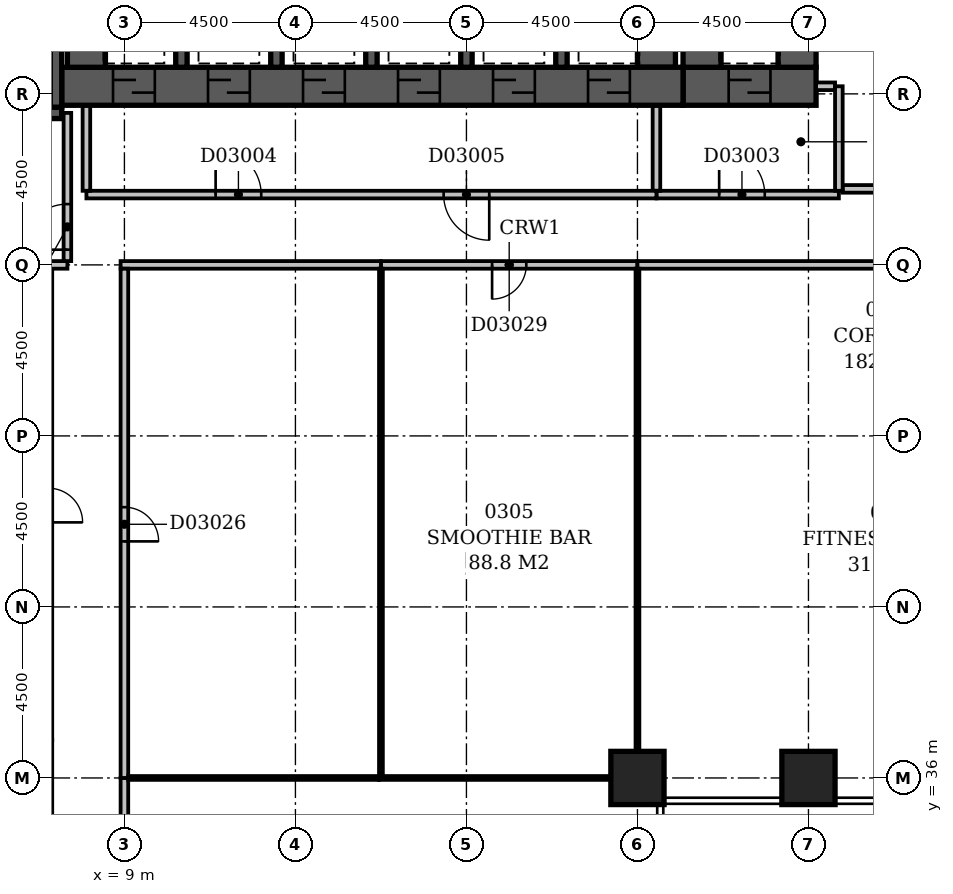
"""IFC4 building model, lengths in metres.
Left out: names, types, materials, properties, quantities, classifications, styles, units other than length and angle.
Written with IfcOpenShell. Run it as: python <this file> out.ifc"""

import sys

from ifc_helpers import new_model, si_unit, direction, frame, frame_2d, origin, origin_2d, place, context, subcontext, project, spatial, rectangle, extrude, element, fill, save


model = new_model("IFC4")
c1 = context("Model", 3, precision=1e-05, world=origin(), true_north=direction((0.0, 1.0)))
c2 = subcontext(c1, "Body", "Model", "MODEL_VIEW")
j1 = project(units=[si_unit("LENGTHUNIT", "METRE"), si_unit("PLANEANGLEUNIT", "RADIAN")], contexts=[c1])
p1 = place(None, origin())
s1 = spatial("IfcSite", under=j1, at=p1, CompositionType="ELEMENT")
p2 = place(p1, origin())
s2 = spatial("IfcBuilding", under=s1, at=p2, CompositionType="ELEMENT")
p3 = place(p2, frame((0.0, 0.0, 19.0)))
s3 = spatial("IfcBuildingStorey", under=s2, at=p3, CompositionType="ELEMENT", Elevation=19.0)
p4 = place(p3, frame((0.35, 53.5, -0.4), z_axis=(0.0, 0.0, 1.0), x_axis=(1.0, 0.0, 0.0)))
e1 = element("IfcWall", 1, at=p4, inside=s3, PredefinedType="SHEAR", context=c2, shape_type="SweptSolid", body=[
    extrude(rectangle(XDim=7.0, YDim=0.3, at=frame_2d((3.5, 0.0))), origin(), (0.0, 0.0, 1.0), 4.95),
])
p5 = place(p4, frame((5.58, 0.0, 0.4)))
e2 = element("IfcOpeningElement", 2, at=p5, cuts=e1, PredefinedType="OPENING", context=c2, shape_type="SweptSolid", body=[
    extrude(rectangle(XDim=1.1, YDim=2.1, at=frame_2d((0.55, 1.05))), frame((0.0, 0.162, 0.0), z_axis=(0.0, -1.0, 0.0), x_axis=(1.0, 0.0, 0.0)), (0.0, 0.0, 1.0), 0.324),
])
p6 = place(p3, frame((7.2, 53.65, -0.4), z_axis=(0.0, 0.0, 1.0), x_axis=(0.0, 1.0, 0.0)))
e3 = element("IfcWall", 3, at=p6, inside=s3, PredefinedType="SHEAR", context=c2, shape_type="SweptSolid", body=[
    extrude(rectangle(XDim=4.2, YDim=0.3, at=frame_2d((2.1, 0.0))), origin(), (0.0, 0.0, 1.0), 4.95),
])
p7 = place(p3, frame((7.35, 54.2, -0.4), z_axis=(0.0, 0.0, 1.0), x_axis=(1.0, 0.0, 0.0)))
e4 = element("IfcWall", 4, at=p7, inside=s3, PredefinedType="SHEAR", context=c2, shape_type="SweptSolid", body=[
    extrude(rectangle(XDim=16.35, YDim=1.0, at=frame_2d((8.175, 0.0))), origin(), (0.0, 0.0, 1.0), 4.95),
])
p8 = place(p7, frame((1.35, 0.0, 0.4)))
e5 = element("IfcOpeningElement", 5, at=p8, cuts=e4, PredefinedType="OPENING", context=c2, shape_type="SweptSolid", body=[
    extrude(rectangle(XDim=1.1, YDim=2.1, at=frame_2d((0.55, 1.05))), frame((0.0, 0.512, 0.0), z_axis=(0.0, -1.0, 0.0), x_axis=(1.0, 0.0, 0.0)), (0.0, 0.0, 1.0), 1.024),
])
p9 = place(p7, frame((3.85, 0.0, 0.4)))
e6 = element("IfcOpeningElement", 6, at=p9, cuts=e4, PredefinedType="OPENING", context=c2, shape_type="SweptSolid", body=[
    extrude(rectangle(XDim=1.1, YDim=2.1, at=frame_2d((0.55, 1.05))), frame((0.0, 0.512, 0.0), z_axis=(0.0, -1.0, 0.0), x_axis=(1.0, 0.0, 0.0)), (0.0, 0.0, 1.0), 1.024),
])
p10 = place(p7, frame((6.35, 0.0, 0.4)))
e7 = element("IfcOpeningElement", 7, at=p10, cuts=e4, PredefinedType="OPENING", context=c2, shape_type="SweptSolid", body=[
    extrude(rectangle(XDim=1.1, YDim=2.1, at=frame_2d((0.55, 1.05))), frame((0.0, 0.512, 0.0), z_axis=(0.0, -1.0, 0.0), x_axis=(1.0, 0.0, 0.0)), (0.0, 0.0, 1.0), 1.024),
])
p11 = place(p7, frame((8.85, 0.0, 0.4)))
e8 = element("IfcOpeningElement", 8, at=p11, cuts=e4, PredefinedType="OPENING", context=c2, shape_type="SweptSolid", body=[
    extrude(rectangle(XDim=1.1, YDim=2.1, at=frame_2d((0.55, 1.05))), frame((0.0, 0.512, 0.0), z_axis=(0.0, -1.0, 0.0), x_axis=(1.0, 0.0, 0.0)), (0.0, 0.0, 1.0), 1.024),
])
p12 = place(p7, frame((11.35, 0.0, 0.4)))
e9 = element("IfcOpeningElement", 9, at=p12, cuts=e4, PredefinedType="OPENING", context=c2, shape_type="SweptSolid", body=[
    extrude(rectangle(XDim=1.1, YDim=2.1, at=frame_2d((0.55, 1.05))), frame((0.0, 0.512, 0.0), z_axis=(0.0, -1.0, 0.0), x_axis=(1.0, 0.0, 0.0)), (0.0, 0.0, 1.0), 1.024),
])
p13 = place(p7, frame((13.85, 0.0, 0.4)))
e10 = element("IfcOpeningElement", 10, at=p13, cuts=e4, PredefinedType="OPENING", context=c2, shape_type="SweptSolid", body=[
    extrude(rectangle(XDim=1.1, YDim=2.1, at=frame_2d((0.55, 1.05))), frame((0.0, 0.512, 0.0), z_axis=(0.0, -1.0, 0.0), x_axis=(1.0, 0.0, 0.0)), (0.0, 0.0, 1.0), 1.024),
])
p14 = place(p3, frame((8.0, 54.7, -0.4), z_axis=(0.0, 0.0, 1.0), x_axis=(0.0, 1.0, 0.0)))
e11 = element("IfcWall", 11, at=p14, inside=s3, PredefinedType="SHEAR", context=c2, shape_type="SweptSolid", body=[
    extrude(rectangle(XDim=2.8, YDim=1.0, at=frame_2d((1.4, 0.0))), origin(), (0.0, 0.0, 1.0), 4.95),
])
for number, where, z_axis, x_axis in (
    (12, (10.5, 54.7, -0.4), (0.0, 0.0, 1.0), (0.0, 1.0, 0.0)),
    (13, (13.0, 54.7, -0.4), (0.0, 0.0, 1.0), (0.0, 1.0, 0.0)),
    (14, (15.5, 54.7, -0.4), (0.0, 0.0, 1.0), (0.0, 1.0, 0.0)),
    (15, (18.0, 54.7, -0.4), (0.0, 0.0, 1.0), (0.0, 1.0, 0.0)),
    (16, (20.5, 54.7, -0.4), (0.0, 0.0, 1.0), (0.0, 1.0, 0.0)),
):
    element("IfcWall", number, at=place(p3, frame(where, z_axis=z_axis, x_axis=x_axis)), inside=s3, PredefinedType="SHEAR", context=c2, shape_type="SweptSolid", body=[
        extrude(rectangle(XDim=2.8, YDim=0.3, at=frame_2d((1.4, 0.0))), origin(), (0.0, 0.0, 1.0), 4.95),
    ])
p15 = place(p3, frame((23.0, 54.7, -0.4), z_axis=(0.0, 0.0, 1.0), x_axis=(0.0, 1.0, 0.0)))
e17 = element("IfcWall", 17, at=p15, inside=s3, PredefinedType="SHEAR", context=c2, shape_type="SweptSolid", body=[
    extrude(rectangle(XDim=2.8, YDim=1.0, at=frame_2d((1.4, 0.0))), origin(), (0.0, 0.0, 1.0), 4.95),
])
p16 = place(p3, frame((23.7, 54.2, -0.4), z_axis=(0.0, 0.0, 1.0), x_axis=(1.0, 0.0, 0.0)))
e18 = element("IfcWall", 18, at=p16, inside=s3, PredefinedType="SHEAR", context=c2, shape_type="SweptSolid", body=[
    extrude(rectangle(XDim=3.5, YDim=1.0, at=frame_2d((1.75, 0.0))), origin(), (0.0, 0.0, 1.0), 4.95),
])
p17 = place(p16, frame((1.2, 0.0, 0.4)))
e19 = element("IfcOpeningElement", 19, at=p17, cuts=e18, PredefinedType="OPENING", context=c2, shape_type="SweptSolid", body=[
    extrude(rectangle(XDim=1.1, YDim=2.1, at=frame_2d((0.55, 1.05))), frame((0.0, 0.512, 0.0), z_axis=(0.0, -1.0, 0.0), x_axis=(1.0, 0.0, 0.0)), (0.0, 0.0, 1.0), 1.024),
])
for number, where, z_axis, x_axis in (
    (20, (24.2, 54.7, -0.4), (0.0, 0.0, 1.0), (0.0, 1.0, 0.0)),
    (21, (26.7, 54.7, -0.4), (0.0, 0.0, 1.0), (0.0, 1.0, 0.0)),
):
    element("IfcWall", number, at=place(p3, frame(where, z_axis=z_axis, x_axis=x_axis)), inside=s3, PredefinedType="SHEAR", context=c2, shape_type="SweptSolid", body=[
        extrude(rectangle(XDim=2.8, YDim=1.0, at=frame_2d((1.4, 0.0))), origin(), (0.0, 0.0, 1.0), 4.95),
    ])
for number, where, z_axis, x_axis in (
    (22, (22.5, 36.0, -0.4), (0.0, 0.0, 1.0), (1.0, 0.0, 0.0)),
    (23, (27.0, 36.0, -0.4), (0.0, 0.0, 1.0), (1.0, 0.0, 0.0)),
):
    element("IfcColumn", number, at=place(p3, frame(where, z_axis=z_axis, x_axis=x_axis)), inside=s3, PredefinedType="COLUMN", context=c2, shape_type="SweptSolid", body=[
        extrude(rectangle(XDim=1.4, YDim=1.4, at=origin_2d()), origin(), (0.0, 0.0, 1.0), 4.95),
    ])
p18 = place(p3, frame((8.0, 51.35, 0.0), z_axis=(0.0, 0.0, 1.0), x_axis=(1.0, 0.0, 0.0)))
e24 = element("IfcWall", 24, at=p18, inside=s3, PredefinedType="PARTITIONING", context=c2, shape_type="SweptSolid", body=[
    extrude(rectangle(XDim=15.0, YDim=0.2, at=frame_2d((7.5, 0.0))), origin(), (0.0, 0.0, 1.0), 4.55),
])
p19 = place(p18, frame((3.4, 0.0, 0.0)))
e25 = element("IfcOpeningElement", 25, at=p19, cuts=e24, PredefinedType="OPENING", context=c2, shape_type="SweptSolid", body=[
    extrude(rectangle(XDim=1.2, YDim=2.1, at=frame_2d((0.6, 1.05))), frame((0.0, 0.112, 0.0), z_axis=(0.0, -1.0, 0.0), x_axis=(1.0, 0.0, 0.0)), (0.0, 0.0, 1.0), 0.224),
])
p20 = place(p18, frame((9.4, 0.0, 0.0)))
e26 = element("IfcOpeningElement", 26, at=p20, cuts=e24, PredefinedType="OPENING", context=c2, shape_type="SweptSolid", body=[
    extrude(rectangle(XDim=1.2, YDim=2.1, at=frame_2d((0.6, 1.05))), frame((0.0, 0.112, 0.0), z_axis=(0.0, -1.0, 0.0), x_axis=(1.0, 0.0, 0.0)), (0.0, 0.0, 1.0), 0.224),
])
for number, where, z_axis, x_axis in (
    (27, (23.0, 51.45, 0.0), (0.0, 0.0, 1.0), (0.0, 1.0, 0.0)),
    (28, (8.0, 51.45, 0.0), (0.0, 0.0, 1.0), (0.0, 1.0, 0.0)),
):
    element("IfcWall", number, at=place(p3, frame(where, z_axis=z_axis, x_axis=x_axis)), inside=s3, PredefinedType="PARTITIONING", context=c2, shape_type="SweptSolid", body=[
        extrude(rectangle(XDim=2.23, YDim=0.2, at=frame_2d((1.115, 0.0))), origin(), (0.0, 0.0, 1.0), 4.55),
    ])
p21 = place(p3, frame((23.0, 51.35, 0.0), z_axis=(0.0, 0.0, 1.0), x_axis=(1.0, 0.0, 0.0)))
e29 = element("IfcWall", 29, at=p21, inside=s3, PredefinedType="PARTITIONING", context=c2, shape_type="SweptSolid", body=[
    extrude(rectangle(XDim=4.8, YDim=0.2, at=frame_2d((2.4, 0.0))), origin(), (0.0, 0.0, 1.0), 4.55),
])
p22 = place(p21, frame((1.65, 0.0, 0.0)))
e30 = element("IfcOpeningElement", 30, at=p22, cuts=e29, PredefinedType="OPENING", context=c2, shape_type="SweptSolid", body=[
    extrude(rectangle(XDim=1.2, YDim=2.1, at=frame_2d((0.6, 1.05))), frame((0.0, 0.112, 0.0), z_axis=(0.0, -1.0, 0.0), x_axis=(1.0, 0.0, 0.0)), (0.0, 0.0, 1.0), 0.224),
])
p23 = place(p3, frame((27.8, 51.45, 0.0), z_axis=(0.0, 0.0, 1.0), x_axis=(0.0, 1.0, 0.0)))
e31 = element("IfcWall", 31, at=p23, inside=s3, PredefinedType="PARTITIONING", context=c2, shape_type="SweptSolid", body=[
    extrude(rectangle(XDim=2.75, YDim=0.2, at=frame_2d((1.375, 0.0))), origin(), (0.0, 0.0, 1.0), 4.55),
])
p24 = place(p3, frame((27.2, 54.2, 0.0), z_axis=(0.0, 0.0, 1.0), x_axis=(1.0, 0.0, 0.0)))
e32 = element("IfcWall", 32, at=p24, inside=s3, PredefinedType="PARTITIONING", context=c2, shape_type="SweptSolid", body=[
    extrude(rectangle(XDim=0.5, YDim=0.2, at=frame_2d((0.25, 0.0))), origin(), (0.0, 0.0, 1.0), 4.55),
])
p25 = place(p3, frame((0.5, 49.5, 0.0), z_axis=(0.0, 0.0, 1.0), x_axis=(1.0, 0.0, 0.0)))
e33 = element("IfcWall", 33, at=p25, inside=s3, PredefinedType="PARTITIONING", context=c2, shape_type="SweptSolid", body=[
    extrude(rectangle(XDim=7.0, YDim=0.2, at=frame_2d((3.5, 0.0))), origin(), (0.0, 0.0, 1.0), 4.55),
])
p26 = place(p3, frame((7.5, 49.6, 0.0), z_axis=(0.0, 0.0, 1.0), x_axis=(0.0, 1.0, 0.0)))
e34 = element("IfcWall", 34, at=p26, inside=s3, PredefinedType="PARTITIONING", context=c2, shape_type="SweptSolid", body=[
    extrude(rectangle(XDim=3.9, YDim=0.2, at=frame_2d((1.95, 0.0))), origin(), (0.0, 0.0, 1.0), 4.55),
])
p27 = place(p26, frame((0.3, 0.0, 0.0)))
e35 = element("IfcOpeningElement", 35, at=p27, cuts=e34, PredefinedType="OPENING", context=c2, shape_type="SweptSolid", body=[
    extrude(rectangle(XDim=1.2, YDim=2.1, at=frame_2d((0.6, 1.05))), frame((0.0, 0.112, 0.0), z_axis=(0.0, -1.0, 0.0), x_axis=(1.0, 0.0, 0.0)), (0.0, 0.0, 1.0), 0.224),
])
p28 = place(p3, frame((9.0, 27.0, 0.0), z_axis=(0.0, 0.0, 1.0), x_axis=(0.0, 1.0, 0.0)))
e36 = element("IfcWall", 36, at=p28, inside=s3, PredefinedType="PARTITIONING", context=c2, shape_type="SweptSolid", body=[
    extrude(rectangle(XDim=9.0, YDim=0.2, at=frame_2d((4.5, 0.0))), origin(), (0.0, 0.0, 1.0), 4.55),
])
p29 = place(p28, frame((4.05, 0.0, 0.0)))
e37 = element("IfcOpeningElement", 37, at=p29, cuts=e36, PredefinedType="OPENING", context=c2, shape_type="SweptSolid", body=[
    extrude(rectangle(XDim=0.9, YDim=2.1, at=frame_2d((0.45, 1.05))), frame((0.0, 0.112, 0.0), z_axis=(0.0, -1.0, 0.0), x_axis=(1.0, 0.0, 0.0)), (0.0, 0.0, 1.0), 0.224),
])
p30 = place(p3, frame((22.5, 35.35, 0.0), z_axis=(0.0, 0.0, 1.0), x_axis=(0.0, 1.0, 0.0)))
e38 = element("IfcWall", 38, at=p30, inside=s3, PredefinedType="PARTITIONING", context=c2, shape_type="SweptSolid", body=[
    extrude(rectangle(XDim=0.6, YDim=0.1, at=frame_2d((0.3, 0.0))), origin(), (0.0, 0.0, 1.0), 3.9),
])
p31 = place(p3, frame((9.0, 36.0, 0.0), z_axis=(0.0, 0.0, 1.0), x_axis=(0.0, 1.0, 0.0)))
e39 = element("IfcWall", 39, at=p31, inside=s3, PredefinedType="PARTITIONING", context=c2, shape_type="SweptSolid", body=[
    extrude(rectangle(XDim=13.4, YDim=0.2, at=frame_2d((6.7, 0.0))), origin(), (0.0, 0.0, 1.0), 4.55),
])
p32 = place(p31, frame((6.225, 0.0, 0.0)))
e40 = element("IfcOpeningElement", 40, at=p32, cuts=e39, PredefinedType="OPENING", context=c2, shape_type="SweptSolid", body=[
    extrude(rectangle(XDim=0.9, YDim=2.1, at=frame_2d((0.45, 1.05))), frame((0.0, 0.112, 0.0), z_axis=(0.0, -1.0, 0.0), x_axis=(1.0, 0.0, 0.0)), (0.0, 0.0, 1.0), 0.224),
])
p33 = place(p3, frame((15.7, 36.0, 0.0), z_axis=(0.0, 0.0, 1.0), x_axis=(-1.0, 0.0, 0.0)))
e41 = element("IfcWall", 41, at=p33, inside=s3, PredefinedType="PARTITIONING", context=c2, shape_type="SweptSolid", body=[
    extrude(rectangle(XDim=6.6, YDim=0.1, at=frame_2d((3.3, 0.0))), origin(), (0.0, 0.0, 1.0), 3.65),
])
p34 = place(p3, frame((22.55, 36.0, 0.0), z_axis=(0.0, 0.0, 1.0), x_axis=(-1.0, 0.0, 0.0)))
e42 = element("IfcWall", 42, at=p34, inside=s3, PredefinedType="PARTITIONING", context=c2, shape_type="SweptSolid", body=[
    extrude(rectangle(XDim=6.85, YDim=0.1, at=frame_2d((3.425, 0.0))), origin(), (0.0, 0.0, 1.0), 3.65),
])
p35 = place(p3, frame((22.5, 36.05, 0.0), z_axis=(0.0, 0.0, 1.0), x_axis=(0.0, 1.0, 0.0)))
e43 = element("IfcWall", 43, at=p35, inside=s3, PredefinedType="PARTITIONING", context=c2, shape_type="SweptSolid", body=[
    extrude(rectangle(XDim=13.35, YDim=0.1, at=frame_2d((6.675, 0.0))), origin(), (0.0, 0.0, 1.0), 4.55),
])
p36 = place(p3, frame((8.9, 49.5, 0.0), z_axis=(0.0, 0.0, 1.0), x_axis=(1.0, 0.0, 0.0)))
e44 = element("IfcWall", 44, at=p36, inside=s3, PredefinedType="PARTITIONING", context=c2, shape_type="SweptSolid", body=[
    extrude(rectangle(XDim=6.85, YDim=0.2, at=frame_2d((3.425, 0.0))), origin(), (0.0, 0.0, 1.0), 4.55),
])
p37 = place(p3, frame((15.75, 49.4, 0.0), z_axis=(0.0, 0.0, 1.0), x_axis=(0.0, -1.0, 0.0)))
e45 = element("IfcWall", 45, at=p37, inside=s3, PredefinedType="PARTITIONING", context=c2, shape_type="SweptSolid", body=[
    extrude(rectangle(XDim=13.35, YDim=0.1, at=frame_2d((6.675, 0.0))), origin(), (0.0, 0.0, 1.0), 4.55),
])
p38 = place(p3, frame((15.75, 49.5, 0.0), z_axis=(0.0, 0.0, 1.0), x_axis=(1.0, 0.0, 0.0)))
e46 = element("IfcWall", 46, at=p38, inside=s3, PredefinedType="PARTITIONING", context=c2, shape_type="SweptSolid", body=[
    extrude(rectangle(XDim=6.75, YDim=0.2, at=frame_2d((3.375, 0.0))), origin(), (0.0, 0.0, 1.0), 4.55),
])
p39 = place(p38, frame((2.925, 0.0, 0.0)))
e47 = element("IfcOpeningElement", 47, at=p39, cuts=e46, PredefinedType="OPENING", context=c2, shape_type="SweptSolid", body=[
    extrude(rectangle(XDim=0.9, YDim=2.1, at=frame_2d((0.45, 1.05))), frame((0.0, 0.112, 0.0), z_axis=(0.0, -1.0, 0.0), x_axis=(1.0, 0.0, 0.0)), (0.0, 0.0, 1.0), 0.224),
])
p40 = place(p3, frame((22.5, 49.5, 0.0), z_axis=(0.0, 0.0, 1.0), x_axis=(1.0, 0.0, 0.0)))
e48 = element("IfcWall", 48, at=p40, inside=s3, PredefinedType="PARTITIONING", context=c2, shape_type="SweptSolid", body=[
    extrude(rectangle(XDim=22.5, YDim=0.2, at=frame_2d((11.25, 0.0))), origin(), (0.0, 0.0, 1.0), 4.55),
])
p41 = place(p40, frame((10.35, 0.0, 0.0)))
e49 = element("IfcOpeningElement", 49, at=p41, cuts=e48, PredefinedType="OPENING", context=c2, shape_type="SweptSolid", body=[
    extrude(rectangle(XDim=1.8, YDim=2.4, at=frame_2d((0.9, 1.2))), frame((0.0, 0.112, 0.0), z_axis=(0.0, -1.0, 0.0), x_axis=(1.0, 0.0, 0.0)), (0.0, 0.0, 1.0), 0.224),
])
p42 = place(p3, frame((37.2, 51.5, 0.0), z_axis=(0.0, 0.0, 1.0), x_axis=(-1.0, 0.0, 0.0)))
e50 = element("IfcWall", 50, at=p42, inside=s3, PredefinedType="PARTITIONING", context=c2, shape_type="SweptSolid", body=[
    extrude(rectangle(XDim=9.3, YDim=0.2, at=frame_2d((4.65, 0.0))), origin(), (0.0, 0.0, 1.0), 4.55),
])
p43 = place(p42, frame((4.15, 0.0, 0.0)))
e51 = element("IfcOpeningElement", 51, at=p43, cuts=e50, PredefinedType="OPENING", context=c2, shape_type="SweptSolid", body=[
    extrude(rectangle(XDim=1.0, YDim=2.1, at=frame_2d((0.5, 1.05))), frame((0.0, 0.112, 0.0), z_axis=(0.0, -1.0, 0.0), x_axis=(1.0, 0.0, 0.0)), (0.0, 0.0, 1.0), 0.224),
])
p44 = place(p27, origin())
e52 = element("IfcDoor", 52, at=p44, inside=s3, OperationType="SINGLE_SWING_LEFT", PredefinedType="DOOR", context=c2, shape_type="SweptSolid", body=[
    extrude(rectangle(XDim=1.2, YDim=2.1, at=frame_2d((0.6, 1.05))), frame((0.0, 0.025, 0.0), z_axis=(0.0, -1.0, 0.0), x_axis=(1.0, 0.0, 0.0)), (0.0, 0.0, 1.0), 0.05),
])
fill(e35, e52)
p45 = place(p22, origin())
e53 = element("IfcDoor", 53, at=p45, inside=s3, OperationType="SINGLE_SWING_LEFT", PredefinedType="DOOR", context=c2, shape_type="SweptSolid", body=[
    extrude(rectangle(XDim=1.2, YDim=2.1, at=frame_2d((0.6, 1.05))), frame((0.0, 0.025, 0.0), z_axis=(0.0, -1.0, 0.0), x_axis=(1.0, 0.0, 0.0)), (0.0, 0.0, 1.0), 0.05),
])
fill(e30, e53)
p46 = place(p17, origin())
e54 = element("IfcDoor", 54, at=p46, inside=s3, OperationType="SLIDING_TO_LEFT", PredefinedType="DOOR", context=c2, shape_type="SweptSolid", body=[
    extrude(rectangle(XDim=1.1, YDim=2.1, at=frame_2d((0.55, 1.05))), frame((0.0, 0.025, 0.0), z_axis=(0.0, -1.0, 0.0), x_axis=(1.0, 0.0, 0.0)), (0.0, 0.0, 1.0), 0.05),
])
fill(e19, e54)
p47 = place(p8, origin())
e55 = element("IfcDoor", 55, at=p47, inside=s3, OperationType="SLIDING_TO_LEFT", PredefinedType="DOOR", context=c2, shape_type="SweptSolid", body=[
    extrude(rectangle(XDim=1.1, YDim=2.1, at=frame_2d((0.55, 1.05))), frame((0.0, 0.025, 0.0), z_axis=(0.0, -1.0, 0.0), x_axis=(1.0, 0.0, 0.0)), (0.0, 0.0, 1.0), 0.05),
])
fill(e5, e55)
p48 = place(p9, origin())
e56 = element("IfcDoor", 56, at=p48, inside=s3, OperationType="SLIDING_TO_LEFT", PredefinedType="DOOR", context=c2, shape_type="SweptSolid", body=[
    extrude(rectangle(XDim=1.1, YDim=2.1, at=frame_2d((0.55, 1.05))), frame((0.0, 0.025, 0.0), z_axis=(0.0, -1.0, 0.0), x_axis=(1.0, 0.0, 0.0)), (0.0, 0.0, 1.0), 0.05),
])
fill(e6, e56)
p49 = place(p10, origin())
e57 = element("IfcDoor", 57, at=p49, inside=s3, OperationType="SLIDING_TO_LEFT", PredefinedType="DOOR", context=c2, shape_type="SweptSolid", body=[
    extrude(rectangle(XDim=1.1, YDim=2.1, at=frame_2d((0.55, 1.05))), frame((0.0, 0.025, 0.0), z_axis=(0.0, -1.0, 0.0), x_axis=(1.0, 0.0, 0.0)), (0.0, 0.0, 1.0), 0.05),
])
fill(e7, e57)
p50 = place(p11, origin())
e58 = element("IfcDoor", 58, at=p50, inside=s3, OperationType="SLIDING_TO_LEFT", PredefinedType="DOOR", context=c2, shape_type="SweptSolid", body=[
    extrude(rectangle(XDim=1.1, YDim=2.1, at=frame_2d((0.55, 1.05))), frame((0.0, 0.025, 0.0), z_axis=(0.0, -1.0, 0.0), x_axis=(1.0, 0.0, 0.0)), (0.0, 0.0, 1.0), 0.05),
])
fill(e8, e58)
p51 = place(p12, origin())
e59 = element("IfcDoor", 59, at=p51, inside=s3, OperationType="SLIDING_TO_LEFT", PredefinedType="DOOR", context=c2, shape_type="SweptSolid", body=[
    extrude(rectangle(XDim=1.1, YDim=2.1, at=frame_2d((0.55, 1.05))), frame((0.0, 0.025, 0.0), z_axis=(0.0, -1.0, 0.0), x_axis=(1.0, 0.0, 0.0)), (0.0, 0.0, 1.0), 0.05),
])
fill(e9, e59)
p52 = place(p13, origin())
e60 = element("IfcDoor", 60, at=p52, inside=s3, OperationType="SLIDING_TO_LEFT", PredefinedType="DOOR", context=c2, shape_type="SweptSolid", body=[
    extrude(rectangle(XDim=1.1, YDim=2.1, at=frame_2d((0.55, 1.05))), frame((0.0, 0.025, 0.0), z_axis=(0.0, -1.0, 0.0), x_axis=(1.0, 0.0, 0.0)), (0.0, 0.0, 1.0), 0.05),
])
fill(e10, e60)
p53 = place(p19, origin())
e61 = element("IfcDoor", 61, at=p53, inside=s3, OperationType="SINGLE_SWING_LEFT", PredefinedType="DOOR", context=c2, shape_type="SweptSolid", body=[
    extrude(rectangle(XDim=1.2, YDim=2.1, at=frame_2d((0.6, 1.05))), frame((0.0, 0.025, 0.0), z_axis=(0.0, -1.0, 0.0), x_axis=(1.0, 0.0, 0.0)), (0.0, 0.0, 1.0), 0.05),
])
fill(e25, e61)
p54 = place(p20, origin())
e62 = element("IfcDoor", 62, at=p54, inside=s3, OperationType="SINGLE_SWING_RIGHT", PredefinedType="DOOR", context=c2, shape_type="SweptSolid", body=[
    extrude(rectangle(XDim=1.2, YDim=2.1, at=frame_2d((0.6, 1.05))), frame((0.0, 0.025, 0.0), z_axis=(0.0, -1.0, 0.0), x_axis=(1.0, 0.0, 0.0)), (0.0, 0.0, 1.0), 0.05),
])
fill(e26, e62)
p55 = place(p32, frame((0.9, 0.0, 0.0), z_axis=(0.0, 0.0, 1.0), x_axis=(-1.0, 0.0, 0.0)))
e63 = element("IfcDoor", 63, at=p55, inside=s3, OperationType="SINGLE_SWING_RIGHT", PredefinedType="DOOR", context=c2, shape_type="SweptSolid", body=[
    extrude(rectangle(XDim=0.9, YDim=2.1, at=frame_2d((0.45, 1.05))), frame((0.0, 0.025, 0.0), z_axis=(0.0, -1.0, 0.0), x_axis=(1.0, 0.0, 0.0)), (0.0, 0.0, 1.0), 0.05),
])
fill(e40, e63)
p56 = place(p39, frame((0.9, 0.0, 0.0), z_axis=(0.0, 0.0, 1.0), x_axis=(-1.0, 0.0, 0.0)))
e64 = element("IfcDoor", 64, at=p56, inside=s3, OperationType="SINGLE_SWING_RIGHT", PredefinedType="DOOR", context=c2, shape_type="SweptSolid", body=[
    extrude(rectangle(XDim=0.9, YDim=2.1, at=frame_2d((0.45, 1.05))), frame((0.0, 0.025, 0.0), z_axis=(0.0, -1.0, 0.0), x_axis=(1.0, 0.0, 0.0)), (0.0, 0.0, 1.0), 0.05),
])
fill(e47, e64)
save(model, sys.argv[1])
